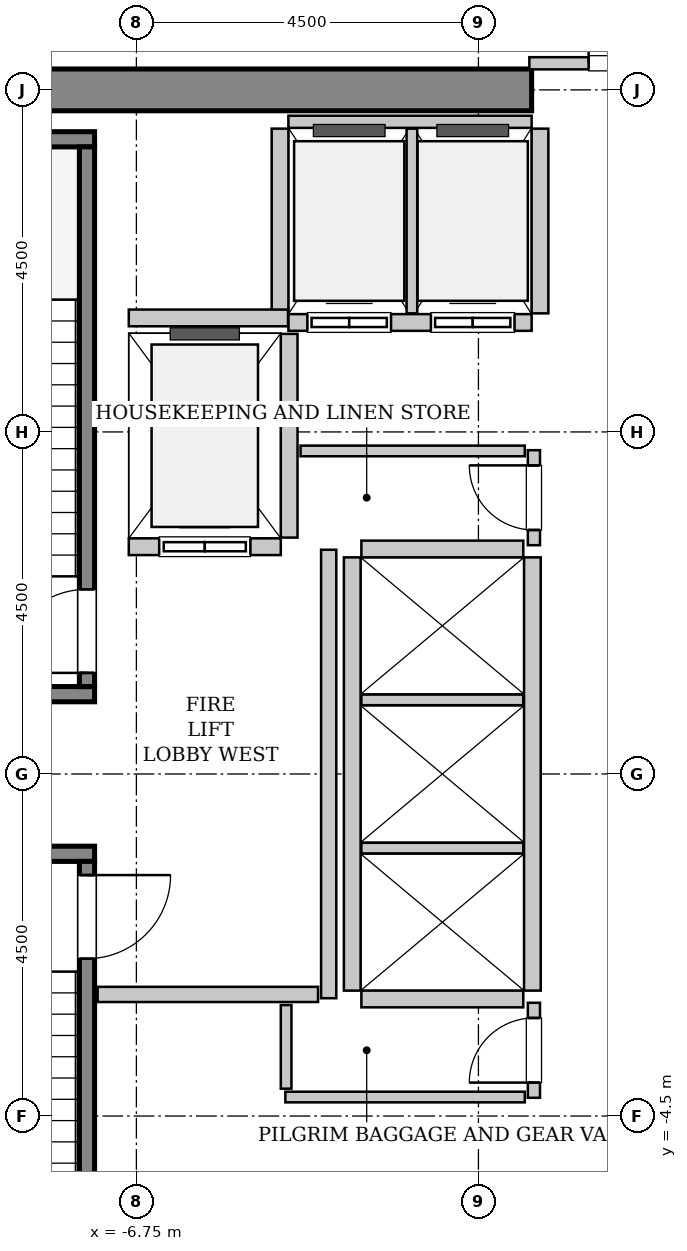
"""IFC4 building model, lengths in metres.
Left out: names, types, materials, properties, quantities, classifications, styles, units other than length and angle.
Written with IfcOpenShell. Run it as: python <this file> out.ifc"""

import sys

from ifc_helpers import new_model, si_unit, direction, frame, frame_2d, origin, place, context, subcontext, project, spatial, rectangle, extrude, source, transform, mapped, element, fill, save


model = new_model("IFC4")
c1 = context("Model", 3, precision=1e-05, world=origin(), true_north=direction((0.0, 1.0)))
c2 = subcontext(c1, "Body", "Model", "MODEL_VIEW")
j1 = project(units=[si_unit("LENGTHUNIT", "METRE"), si_unit("PLANEANGLEUNIT", "RADIAN")], contexts=[c1])
p1 = place(None, origin())
s1 = spatial("IfcSite", under=j1, at=p1, CompositionType="ELEMENT")
p2 = place(p1, origin())
s2 = spatial("IfcBuilding", under=s1, at=p2, CompositionType="ELEMENT")
p3 = place(p2, frame((0.0, 0.0, 144.0)))
s3 = spatial("IfcBuildingStorey", under=s2, at=p3, CompositionType="ELEMENT", Elevation=144.0)
m1 = source(origin(), c2, "Body", "SweptSolid", [
    extrude(rectangle(XDim=9.975, YDim=0.55, at=frame_2d((4.987, 0.0))), origin(), (0.0, 0.0, 1.0), 4.8),
])
p4 = place(p3, frame((-11.525, 9.0, 0.0), z_axis=(0.0, 0.0, 1.0), x_axis=(1.0, 0.0, 0.0)))
e1 = element("IfcWall", 1, at=p4, inside=s3, PredefinedType="SHEAR", context=c2, shape_type="MappedRepresentation", body=[
    mapped(m1, transform((0.0, 0.0, 0.0), x_axis=(1.0, 0.0, 0.0), y_axis=(0.0, 1.0, 0.0), z_axis=(0.0, 0.0, 1.0), scale=1.0)),
])
m2 = source(origin(), c2, "Body", "SweptSolid", [
    extrude(rectangle(XDim=3.4, YDim=0.2, at=frame_2d((1.7, 0.0))), origin(), (0.0, 0.0, 1.0), 4.8),
])
p5 = place(p3, frame((-7.3, 1.05, 0.0), z_axis=(0.0, 0.0, 1.0), x_axis=(-1.0, 0.0, 0.0)))
e2 = element("IfcWall", 2, at=p5, inside=s3, PredefinedType="SOLIDWALL", context=c2, shape_type="MappedRepresentation", body=[
    mapped(m2, transform((0.0, 0.0, 0.0), x_axis=(1.0, 0.0, 0.0), y_axis=(0.0, 1.0, 0.0), z_axis=(0.0, 0.0, 1.0), scale=1.0)),
])
m3 = source(origin(), c2, "Body", "SweptSolid", [
    extrude(rectangle(XDim=3.68, YDim=0.2, at=frame_2d((1.84, 0.0))), origin(), (0.0, 0.0, 1.0), 4.8),
])
p6 = place(p3, frame((-7.3, 8.35, 0.0), z_axis=(0.0, 0.0, 1.0), x_axis=(-1.0, 0.0, 0.0)))
e3 = element("IfcWall", 3, at=p6, inside=s3, PredefinedType="SOLIDWALL", context=c2, shape_type="MappedRepresentation", body=[
    mapped(m3, transform((0.0, 0.0, 0.0), x_axis=(1.0, 0.0, 0.0), y_axis=(0.0, 1.0, 0.0), z_axis=(0.0, 0.0, 1.0), scale=1.0)),
])
m4 = source(origin(), c2, "Body", "SweptSolid", [
    extrude(rectangle(XDim=7.1, YDim=0.2, at=frame_2d((3.55, 0.0))), origin(), (0.0, 0.0, 1.0), 4.8),
])
p7 = place(p3, frame((-7.4, 1.15, 0.0), z_axis=(0.0, 0.0, 1.0), x_axis=(0.0, 1.0, 0.0)))
e4 = element("IfcWall", 4, at=p7, inside=s3, PredefinedType="SOLIDWALL", context=c2, shape_type="MappedRepresentation", body=[
    mapped(m4, transform((0.0, 0.0, 0.0), x_axis=(1.0, 0.0, 0.0), y_axis=(0.0, 1.0, 0.0), z_axis=(0.0, 0.0, 1.0), scale=1.0)),
])
p8 = place(p7, frame((0.18, 0.0, 0.0)))
e5 = element("IfcOpeningElement", 5, at=p8, cuts=e4, PredefinedType="OPENING", context=c2, shape_type="SweptSolid", body=[
    extrude(rectangle(XDim=1.1, YDim=2.15, at=frame_2d((0.55, 1.075))), frame((0.0, 0.11, 0.0), z_axis=(0.0, -1.0, 0.0), x_axis=(1.0, 0.0, 0.0)), (0.0, 0.0, 1.0), 0.22),
])
p9 = place(p3, frame((-10.7, -1.05, 0.0), z_axis=(0.0, 0.0, 1.0), x_axis=(1.0, 0.0, 0.0)))
e6 = element("IfcWall", 6, at=p9, inside=s3, PredefinedType="SOLIDWALL", context=c2, shape_type="MappedRepresentation", body=[
    mapped(m2, transform((0.0, 0.0, 0.0), x_axis=(1.0, 0.0, 0.0), y_axis=(0.0, 1.0, 0.0), z_axis=(0.0, 0.0, 1.0), scale=1.0)),
])
p10 = place(p3, frame((-7.4, -1.15, 0.0), z_axis=(0.0, 0.0, 1.0), x_axis=(0.0, -1.0, 0.0)))
e7 = element("IfcWall", 7, at=p10, inside=s3, PredefinedType="SOLIDWALL", context=c2, shape_type="MappedRepresentation", body=[
    mapped(m4, transform((0.0, 0.0, 0.0), x_axis=(1.0, 0.0, 0.0), y_axis=(0.0, 1.0, 0.0), z_axis=(0.0, 0.0, 1.0), scale=1.0)),
])
p11 = place(p10, frame((0.18, 0.0, 0.0)))
e8 = element("IfcOpeningElement", 8, at=p11, cuts=e7, PredefinedType="OPENING", context=c2, shape_type="SweptSolid", body=[
    extrude(rectangle(XDim=1.1, YDim=2.15, at=frame_2d((0.55, 1.075))), frame((0.0, 0.11, 0.0), z_axis=(0.0, -1.0, 0.0), x_axis=(1.0, 0.0, 0.0)), (0.0, 0.0, 1.0), 0.22),
])
m5 = source(origin(), c2, "Body", "SweptSolid", [
    extrude(rectangle(XDim=2.0, YDim=0.22, at=frame_2d((1.0, 0.0))), origin(), (0.0, 0.0, 1.0), 4.535),
])
p12 = place(p3, frame((-6.85, 2.99, 0.0), z_axis=(0.0, 0.0, 1.0), x_axis=(1.0, 0.0, 0.0)))
e9 = element("IfcWall", 9, at=p12, inside=s3, PredefinedType="SOLIDWALL", context=c2, shape_type="MappedRepresentation", body=[
    mapped(m5, transform((0.0, 0.0, 0.0), x_axis=(1.0, 0.0, 0.0), y_axis=(0.0, 1.0, 0.0), z_axis=(0.0, 0.0, 1.0), scale=1.0)),
])
p13 = place(p12, frame((0.4, 0.0, 0.0)))
e10 = element("IfcOpeningElement", 10, at=p13, cuts=e9, PredefinedType="OPENING", context=c2, shape_type="SweptSolid", body=[
    extrude(rectangle(XDim=1.2, YDim=2.2, at=frame_2d((0.6, 1.1))), frame((0.0, 0.12, 0.0), z_axis=(0.0, -1.0, 0.0), x_axis=(1.0, 0.0, 0.0)), (0.0, 0.0, 1.0), 0.24),
])
m6 = source(origin(), c2, "Body", "SweptSolid", [
    extrude(rectangle(XDim=2.68, YDim=0.22, at=frame_2d((1.34, 0.0))), origin(), (0.0, 0.0, 1.0), 4.535),
])
p14 = place(p3, frame((-4.74, 3.11, 0.0), z_axis=(0.0, 0.0, 1.0), x_axis=(0.0, 1.0, 0.0)))
e11 = element("IfcWall", 11, at=p14, inside=s3, PredefinedType="SOLIDWALL", context=c2, shape_type="MappedRepresentation", body=[
    mapped(m6, transform((0.0, 0.0, 0.0), x_axis=(1.0, 0.0, 0.0), y_axis=(0.0, 1.0, 0.0), z_axis=(0.0, 0.0, 1.0), scale=1.0)),
])
m7 = source(origin(), c2, "Body", "SweptSolid", [
    extrude(rectangle(XDim=3.2, YDim=0.22, at=frame_2d((1.6, 0.0))), origin(), (0.0, 0.0, 1.0), 4.535),
])
p15 = place(p3, frame((-4.75, 5.94, 0.0), z_axis=(0.0, 0.0, 1.0), x_axis=(1.0, 0.0, 0.0)))
e12 = element("IfcWall", 12, at=p15, inside=s3, PredefinedType="SOLIDWALL", context=c2, shape_type="MappedRepresentation", body=[
    mapped(m7, transform((0.0, 0.0, 0.0), x_axis=(1.0, 0.0, 0.0), y_axis=(0.0, 1.0, 0.0), z_axis=(0.0, 0.0, 1.0), scale=1.0)),
])
p16 = place(p15, frame((0.25, 0.0, 0.0)))
e13 = element("IfcOpeningElement", 13, at=p16, cuts=e12, PredefinedType="OPENING", context=c2, shape_type="SweptSolid", body=[
    extrude(rectangle(XDim=1.1, YDim=2.2, at=frame_2d((0.55, 1.1))), frame((0.0, 0.12, 0.0), z_axis=(0.0, -1.0, 0.0), x_axis=(1.0, 0.0, 0.0)), (0.0, 0.0, 1.0), 0.24),
])
p17 = place(p15, frame((1.875, 0.0, 0.0)))
e14 = element("IfcOpeningElement", 14, at=p17, cuts=e12, PredefinedType="OPENING", context=c2, shape_type="SweptSolid", body=[
    extrude(rectangle(XDim=1.1, YDim=2.2, at=frame_2d((0.55, 1.1))), frame((0.0, 0.12, 0.0), z_axis=(0.0, -1.0, 0.0), x_axis=(1.0, 0.0, 0.0)), (0.0, 0.0, 1.0), 0.24),
])
m8 = source(origin(), c2, "Body", "SweptSolid", [
    extrude(rectangle(XDim=3.2, YDim=0.16, at=frame_2d((1.6, 0.0))), origin(), (0.0, 0.0, 1.0), 3.425),
])
p18 = place(p3, frame((-1.55, 8.58, 0.0), z_axis=(0.0, 0.0, 1.0), x_axis=(-1.0, 0.0, 0.0)))
e15 = element("IfcWall", 15, at=p18, inside=s3, PredefinedType="PARTITIONING", context=c2, shape_type="MappedRepresentation", body=[
    mapped(m8, transform((0.0, 0.0, 0.0), x_axis=(1.0, 0.0, 0.0), y_axis=(0.0, 1.0, 0.0), z_axis=(0.0, 0.0, 1.0), scale=1.0)),
])
m9 = source(origin(), c2, "Body", "SweptSolid", [
    extrude(rectangle(XDim=2.43, YDim=0.22, at=frame_2d((1.215, 0.0))), origin(), (0.0, 0.0, 1.0), 4.535),
])
p19 = place(p3, frame((-4.86, 8.49, 0.0), z_axis=(0.0, 0.0, 1.0), x_axis=(0.0, -1.0, 0.0)))
e16 = element("IfcWall", 16, at=p19, inside=s3, PredefinedType="SOLIDWALL", context=c2, shape_type="MappedRepresentation", body=[
    mapped(m9, transform((0.0, 0.0, 0.0), x_axis=(1.0, 0.0, 0.0), y_axis=(0.0, 1.0, 0.0), z_axis=(0.0, 0.0, 1.0), scale=1.0)),
])
m10 = source(origin(), c2, "Body", "SweptSolid", [
    extrude(rectangle(XDim=2.43, YDim=0.14, at=frame_2d((1.215, 0.0))), origin(), (0.0, 0.0, 1.0), 4.535),
])
p20 = place(p3, frame((-3.125, 6.06, 0.0), z_axis=(0.0, 0.0, 1.0), x_axis=(0.0, 1.0, 0.0)))
e17 = element("IfcWall", 17, at=p20, inside=s3, PredefinedType="PARTITIONING", context=c2, shape_type="MappedRepresentation", body=[
    mapped(m10, transform((0.0, 0.0, 0.0), x_axis=(1.0, 0.0, 0.0), y_axis=(0.0, 1.0, 0.0), z_axis=(0.0, 0.0, 1.0), scale=1.0)),
])
p21 = place(p3, frame((-1.44, 6.06, 0.0), z_axis=(0.0, 0.0, 1.0), x_axis=(0.0, 1.0, 0.0)))
e18 = element("IfcWall", 18, at=p21, inside=s3, PredefinedType="SOLIDWALL", context=c2, shape_type="MappedRepresentation", body=[
    mapped(m9, transform((0.0, 0.0, 0.0), x_axis=(1.0, 0.0, 0.0), y_axis=(0.0, 1.0, 0.0), z_axis=(0.0, 0.0, 1.0), scale=1.0)),
])
m11 = source(origin(), c2, "Body", "SweptSolid", [
    extrude(rectangle(XDim=5.7, YDim=0.22, at=frame_2d((2.85, 0.0))), origin(), (0.0, 0.0, 1.0), 4.535),
])
for number, where, z_axis, x_axis in (
    (19, (-1.54, -2.85, 0.0), (0.0, 0.0, 1.0), (0.0, 1.0, 0.0)),
    (20, (-3.91, 2.85, 0.0), (0.0, 0.0, 1.0), (0.0, -1.0, 0.0)),
):
    element("IfcWall", number, at=place(p3, frame(where, z_axis=z_axis, x_axis=x_axis)), inside=s3, PredefinedType="SOLIDWALL", context=c2, shape_type="MappedRepresentation", body=[
        mapped(m11, transform((0.0, 0.0, 0.0), x_axis=(1.0, 0.0, 0.0), y_axis=(0.0, 1.0, 0.0), z_axis=(0.0, 0.0, 1.0), scale=1.0)),
    ])
m12 = source(origin(), c2, "Body", "SweptSolid", [
    extrude(rectangle(XDim=2.13, YDim=0.22, at=frame_2d((1.065, 0.0))), origin(), (0.0, 0.0, 1.0), 4.535),
])
p22 = place(p3, frame((-3.79, -2.96, 0.0), z_axis=(0.0, 0.0, 1.0), x_axis=(1.0, 0.0, 0.0)))
e21 = element("IfcWall", 21, at=p22, inside=s3, PredefinedType="SOLIDWALL", context=c2, shape_type="MappedRepresentation", body=[
    mapped(m12, transform((0.0, 0.0, 0.0), x_axis=(1.0, 0.0, 0.0), y_axis=(0.0, 1.0, 0.0), z_axis=(0.0, 0.0, 1.0), scale=1.0)),
])
m13 = source(origin(), c2, "Body", "SweptSolid", [
    extrude(rectangle(XDim=2.13, YDim=0.14, at=frame_2d((1.065, 0.0))), origin(), (0.0, 0.0, 1.0), 4.535),
])
for number, where, z_axis, x_axis in (
    (22, (-3.79, -0.975, 0.0), (0.0, 0.0, 1.0), (1.0, 0.0, 0.0)),
    (23, (-3.79, 0.975, 0.0), (0.0, 0.0, 1.0), (1.0, 0.0, 0.0)),
):
    element("IfcWall", number, at=place(p3, frame(where, z_axis=z_axis, x_axis=x_axis)), inside=s3, PredefinedType="PARTITIONING", context=c2, shape_type="MappedRepresentation", body=[
        mapped(m13, transform((0.0, 0.0, 0.0), x_axis=(1.0, 0.0, 0.0), y_axis=(0.0, 1.0, 0.0), z_axis=(0.0, 0.0, 1.0), scale=1.0)),
    ])
p23 = place(p3, frame((-1.66, 2.96, 0.0), z_axis=(0.0, 0.0, 1.0), x_axis=(-1.0, 0.0, 0.0)))
e24 = element("IfcWall", 24, at=p23, inside=s3, PredefinedType="SOLIDWALL", context=c2, shape_type="MappedRepresentation", body=[
    mapped(m12, transform((0.0, 0.0, 0.0), x_axis=(1.0, 0.0, 0.0), y_axis=(0.0, 1.0, 0.0), z_axis=(0.0, 0.0, 1.0), scale=1.0)),
])
m14 = source(origin(), c2, "Body", "SweptSolid", [
    extrude(rectangle(XDim=2.095, YDim=0.22, at=frame_2d((1.048, 0.0))), origin(), (0.0, 0.0, 1.0), 4.535),
])
p24 = place(p3, frame((-6.85, 6.0, 0.0), z_axis=(0.0, 0.0, 1.0), x_axis=(1.0, 0.0, 0.0)))
e25 = element("IfcWall", 25, at=p24, inside=s3, PredefinedType="SOLIDWALL", context=c2, shape_type="MappedRepresentation", body=[
    mapped(m14, transform((0.0, 0.0, 0.0), x_axis=(1.0, 0.0, 0.0), y_axis=(0.0, 1.0, 0.0), z_axis=(0.0, 0.0, 1.0), scale=1.0)),
])
m15 = source(origin(), c2, "Body", "SweptSolid", [
    extrude(rectangle(XDim=5.9, YDim=0.2, at=frame_2d((2.95, 0.0))), origin(), (0.0, 0.0, 1.0), 4.535),
])
p25 = place(p3, frame((-4.22, -2.95, 0.0), z_axis=(0.0, 0.0, 1.0), x_axis=(0.0, 1.0, 0.0)))
e26 = element("IfcWall", 26, at=p25, inside=s3, PredefinedType="PARTITIONING", context=c2, shape_type="MappedRepresentation", body=[
    mapped(m15, transform((0.0, 0.0, 0.0), x_axis=(1.0, 0.0, 0.0), y_axis=(0.0, 1.0, 0.0), z_axis=(0.0, 0.0, 1.0), scale=1.0)),
])
m16 = source(origin(), c2, "Body", "SweptSolid", [
    extrude(rectangle(XDim=2.9, YDim=0.2, at=frame_2d((1.45, 0.0))), origin(), (0.0, 0.0, 1.0), 4.535),
])
p26 = place(p3, frame((-7.26, -2.9, 0.0), z_axis=(0.0, 0.0, 1.0), x_axis=(1.0, 0.0, 0.0)))
e27 = element("IfcWall", 27, at=p26, inside=s3, PredefinedType="PARTITIONING", context=c2, shape_type="MappedRepresentation", body=[
    mapped(m16, transform((0.0, 0.0, 0.0), x_axis=(1.0, 0.0, 0.0), y_axis=(0.0, 1.0, 0.0), z_axis=(0.0, 0.0, 1.0), scale=1.0)),
])
m17 = source(origin(), c2, "Body", "SweptSolid", [
    extrude(rectangle(XDim=3.16, YDim=0.16, at=frame_2d((1.58, 0.0))), origin(), (0.0, 0.0, 1.0), 3.425),
])
p27 = place(p3, frame((-1.58, 9.35, 0.0), z_axis=(0.0, 0.0, 1.0), x_axis=(1.0, 0.0, 0.0)))
e28 = element("IfcWall", 28, at=p27, inside=s3, PredefinedType="PARTITIONING", context=c2, shape_type="MappedRepresentation", body=[
    mapped(m17, transform((0.0, 0.0, 0.0), x_axis=(1.0, 0.0, 0.0), y_axis=(0.0, 1.0, 0.0), z_axis=(0.0, 0.0, 1.0), scale=1.0)),
])
p28 = place(p27, frame((0.78, 0.0, 0.0)))
e29 = element("IfcOpeningElement", 29, at=p28, cuts=e28, PredefinedType="OPENING", context=c2, shape_type="SweptSolid", body=[
    extrude(rectangle(XDim=1.6, YDim=2.3, at=frame_2d((0.8, 1.15))), frame((0.0, 0.09, 0.0), z_axis=(0.0, -1.0, 0.0), x_axis=(1.0, 0.0, 0.0)), (0.0, 0.0, 1.0), 0.18),
])
m18 = source(origin(), c2, "Body", "SweptSolid", [
    extrude(rectangle(XDim=1.25, YDim=0.16, at=frame_2d((0.625, 0.0))), origin(), (0.0, 0.0, 1.0), 4.535),
])
p29 = place(p3, frame((-1.52, 3.01, 0.0), z_axis=(0.0, 0.0, 1.0), x_axis=(0.0, 1.0, 0.0)))
e30 = element("IfcWall", 30, at=p29, inside=s3, PredefinedType="PARTITIONING", context=c2, shape_type="MappedRepresentation", body=[
    mapped(m18, transform((0.0, 0.0, 0.0), x_axis=(1.0, 0.0, 0.0), y_axis=(0.0, 1.0, 0.0), z_axis=(0.0, 0.0, 1.0), scale=1.0)),
])
p30 = place(p29, frame((0.2, 0.0, 0.0)))
e31 = element("IfcOpeningElement", 31, at=p30, cuts=e30, PredefinedType="OPENING", context=c2, shape_type="SweptSolid", body=[
    extrude(rectangle(XDim=0.85, YDim=2.1, at=frame_2d((0.425, 1.05))), frame((0.0, 0.09, 0.0), z_axis=(0.0, -1.0, 0.0), x_axis=(1.0, 0.0, 0.0)), (0.0, 0.0, 1.0), 0.18),
])
m19 = source(origin(), c2, "Body", "SweptSolid", [
    extrude(rectangle(XDim=2.95, YDim=0.14, at=frame_2d((1.475, 0.0))), origin(), (0.0, 0.0, 1.0), 4.535),
])
p31 = place(p3, frame((-4.59, 4.25, 0.0), z_axis=(0.0, 0.0, 1.0), x_axis=(1.0, 0.0, 0.0)))
e32 = element("IfcWall", 32, at=p31, inside=s3, PredefinedType="PARTITIONING", context=c2, shape_type="MappedRepresentation", body=[
    mapped(m19, transform((0.0, 0.0, 0.0), x_axis=(1.0, 0.0, 0.0), y_axis=(0.0, 1.0, 0.0), z_axis=(0.0, 0.0, 1.0), scale=1.0)),
])
p32 = place(p3, frame((-1.52, -4.26, 0.0), z_axis=(0.0, 0.0, 1.0), x_axis=(0.0, 1.0, 0.0)))
e33 = element("IfcWall", 33, at=p32, inside=s3, PredefinedType="PARTITIONING", context=c2, shape_type="MappedRepresentation", body=[
    mapped(m18, transform((0.0, 0.0, 0.0), x_axis=(1.0, 0.0, 0.0), y_axis=(0.0, 1.0, 0.0), z_axis=(0.0, 0.0, 1.0), scale=1.0)),
])
p33 = place(p32, frame((0.2, 0.0, 0.0)))
e34 = element("IfcOpeningElement", 34, at=p33, cuts=e33, PredefinedType="OPENING", context=c2, shape_type="SweptSolid", body=[
    extrude(rectangle(XDim=0.85, YDim=2.1, at=frame_2d((0.425, 1.05))), frame((0.0, 0.09, 0.0), z_axis=(0.0, -1.0, 0.0), x_axis=(1.0, 0.0, 0.0)), (0.0, 0.0, 1.0), 0.18),
])
m20 = source(origin(), c2, "Body", "SweptSolid", [
    extrude(rectangle(XDim=3.15, YDim=0.14, at=frame_2d((1.575, 0.0))), origin(), (0.0, 0.0, 1.0), 4.535),
])
p34 = place(p3, frame((-4.79, -4.25, 0.0), z_axis=(0.0, 0.0, 1.0), x_axis=(1.0, 0.0, 0.0)))
e35 = element("IfcWall", 35, at=p34, inside=s3, PredefinedType="PARTITIONING", context=c2, shape_type="MappedRepresentation", body=[
    mapped(m20, transform((0.0, 0.0, 0.0), x_axis=(1.0, 0.0, 0.0), y_axis=(0.0, 1.0, 0.0), z_axis=(0.0, 0.0, 1.0), scale=1.0)),
])
m21 = source(origin(), c2, "Body", "SweptSolid", [
    extrude(rectangle(XDim=1.1, YDim=0.14, at=frame_2d((0.55, 0.0))), origin(), (0.0, 0.0, 1.0), 4.535),
])
p35 = place(p3, frame((-4.78, -4.14, 0.0), z_axis=(0.0, 0.0, 1.0), x_axis=(0.0, 1.0, 0.0)))
e36 = element("IfcWall", 36, at=p35, inside=s3, PredefinedType="PARTITIONING", context=c2, shape_type="MappedRepresentation", body=[
    mapped(m21, transform((0.0, 0.0, 0.0), x_axis=(1.0, 0.0, 0.0), y_axis=(0.0, 1.0, 0.0), z_axis=(0.0, 0.0, 1.0), scale=1.0)),
])
m22 = source(origin(), c2, "Body", "SweptSolid", [
    extrude(rectangle(XDim=1.1, YDim=2.15, at=frame_2d((0.55, 1.075))), frame((0.0, 0.025, 0.0), z_axis=(0.0, -1.0, 0.0), x_axis=(1.0, 0.0, 0.0)), (0.0, 0.0, 1.0), 0.05),
])
p36 = place(p8, origin())
e37 = element("IfcDoor", 37, at=p36, inside=s3, OperationType="SINGLE_SWING_LEFT", PredefinedType="DOOR", context=c2, shape_type="MappedRepresentation", body=[
    mapped(m22, transform((0.0, 0.0, 0.0), x_axis=(1.0, 0.0, 0.0), y_axis=(0.0, 1.0, 0.0), z_axis=(0.0, 0.0, 1.0), scale=1.0)),
])
fill(e5, e37)
p37 = place(p11, origin())
e38 = element("IfcDoor", 38, at=p37, inside=s3, OperationType="SINGLE_SWING_LEFT", PredefinedType="DOOR", context=c2, shape_type="MappedRepresentation", body=[
    mapped(m22, transform((0.0, 0.0, 0.0), x_axis=(1.0, 0.0, 0.0), y_axis=(0.0, 1.0, 0.0), z_axis=(0.0, 0.0, 1.0), scale=1.0)),
])
fill(e8, e38)
m23 = source(origin(), c2, "Body", "SweptSolid", [
    extrude(rectangle(XDim=1.2, YDim=2.2, at=frame_2d((0.6, 1.1))), frame((0.0, 0.025, 0.0), z_axis=(0.0, -1.0, 0.0), x_axis=(1.0, 0.0, 0.0)), (0.0, 0.0, 1.0), 0.05),
])
p38 = place(p13, origin())
e39 = element("IfcDoor", 39, at=p38, inside=s3, OperationType="SLIDING_TO_LEFT", PredefinedType="DOOR", context=c2, shape_type="MappedRepresentation", body=[
    mapped(m23, transform((0.0, 0.0, 0.0), x_axis=(1.0, 0.0, 0.0), y_axis=(0.0, 1.0, 0.0), z_axis=(0.0, 0.0, 1.0), scale=1.0)),
])
fill(e10, e39)
m24 = source(origin(), c2, "Body", "SweptSolid", [
    extrude(rectangle(XDim=1.1, YDim=2.2, at=frame_2d((0.55, 1.1))), frame((0.0, 0.025, 0.0), z_axis=(0.0, -1.0, 0.0), x_axis=(1.0, 0.0, 0.0)), (0.0, 0.0, 1.0), 0.05),
])
p39 = place(p16, origin())
e40 = element("IfcDoor", 40, at=p39, inside=s3, OperationType="DOUBLE_DOOR_SLIDING", PredefinedType="DOOR", context=c2, shape_type="MappedRepresentation", body=[
    mapped(m24, transform((0.0, 0.0, 0.0), x_axis=(1.0, 0.0, 0.0), y_axis=(0.0, 1.0, 0.0), z_axis=(0.0, 0.0, 1.0), scale=1.0)),
])
fill(e13, e40)
p40 = place(p17, origin())
e41 = element("IfcDoor", 41, at=p40, inside=s3, OperationType="DOUBLE_DOOR_SLIDING", PredefinedType="DOOR", context=c2, shape_type="MappedRepresentation", body=[
    mapped(m24, transform((0.0, 0.0, 0.0), x_axis=(1.0, 0.0, 0.0), y_axis=(0.0, 1.0, 0.0), z_axis=(0.0, 0.0, 1.0), scale=1.0)),
])
fill(e14, e41)
m25 = source(origin(), c2, "Body", "SweptSolid", [
    extrude(rectangle(XDim=1.6, YDim=2.3, at=frame_2d((0.8, 1.15))), frame((0.0, 0.025, 0.0), z_axis=(0.0, -1.0, 0.0), x_axis=(1.0, 0.0, 0.0)), (0.0, 0.0, 1.0), 0.05),
])
p41 = place(p28, origin())
e42 = element("IfcDoor", 42, at=p41, inside=s3, OperationType="DOUBLE_DOOR_SINGLE_SWING", PredefinedType="DOOR", context=c2, shape_type="MappedRepresentation", body=[
    mapped(m25, transform((0.0, 0.0, 0.0), x_axis=(1.0, 0.0, 0.0), y_axis=(0.0, 1.0, 0.0), z_axis=(0.0, 0.0, 1.0), scale=1.0)),
])
fill(e29, e42)
m26 = source(origin(), c2, "Body", "SweptSolid", [
    extrude(rectangle(XDim=0.85, YDim=2.1, at=frame_2d((0.425, 1.05))), frame((0.0, 0.025, 0.0), z_axis=(0.0, -1.0, 0.0), x_axis=(1.0, 0.0, 0.0)), (0.0, 0.0, 1.0), 0.05),
])
p42 = place(p30, origin())
e43 = element("IfcDoor", 43, at=p42, inside=s3, OperationType="SINGLE_SWING_RIGHT", PredefinedType="DOOR", context=c2, shape_type="MappedRepresentation", body=[
    mapped(m26, transform((0.0, 0.0, 0.0), x_axis=(1.0, 0.0, 0.0), y_axis=(0.0, 1.0, 0.0), z_axis=(0.0, 0.0, 1.0), scale=1.0)),
])
fill(e31, e43)
p43 = place(p33, origin())
e44 = element("IfcDoor", 44, at=p43, inside=s3, OperationType="SINGLE_SWING_LEFT", PredefinedType="DOOR", context=c2, shape_type="MappedRepresentation", body=[
    mapped(m26, transform((0.0, 0.0, 0.0), x_axis=(1.0, 0.0, 0.0), y_axis=(0.0, 1.0, 0.0), z_axis=(0.0, 0.0, 1.0), scale=1.0)),
])
fill(e34, e44)
save(model, sys.argv[1])
